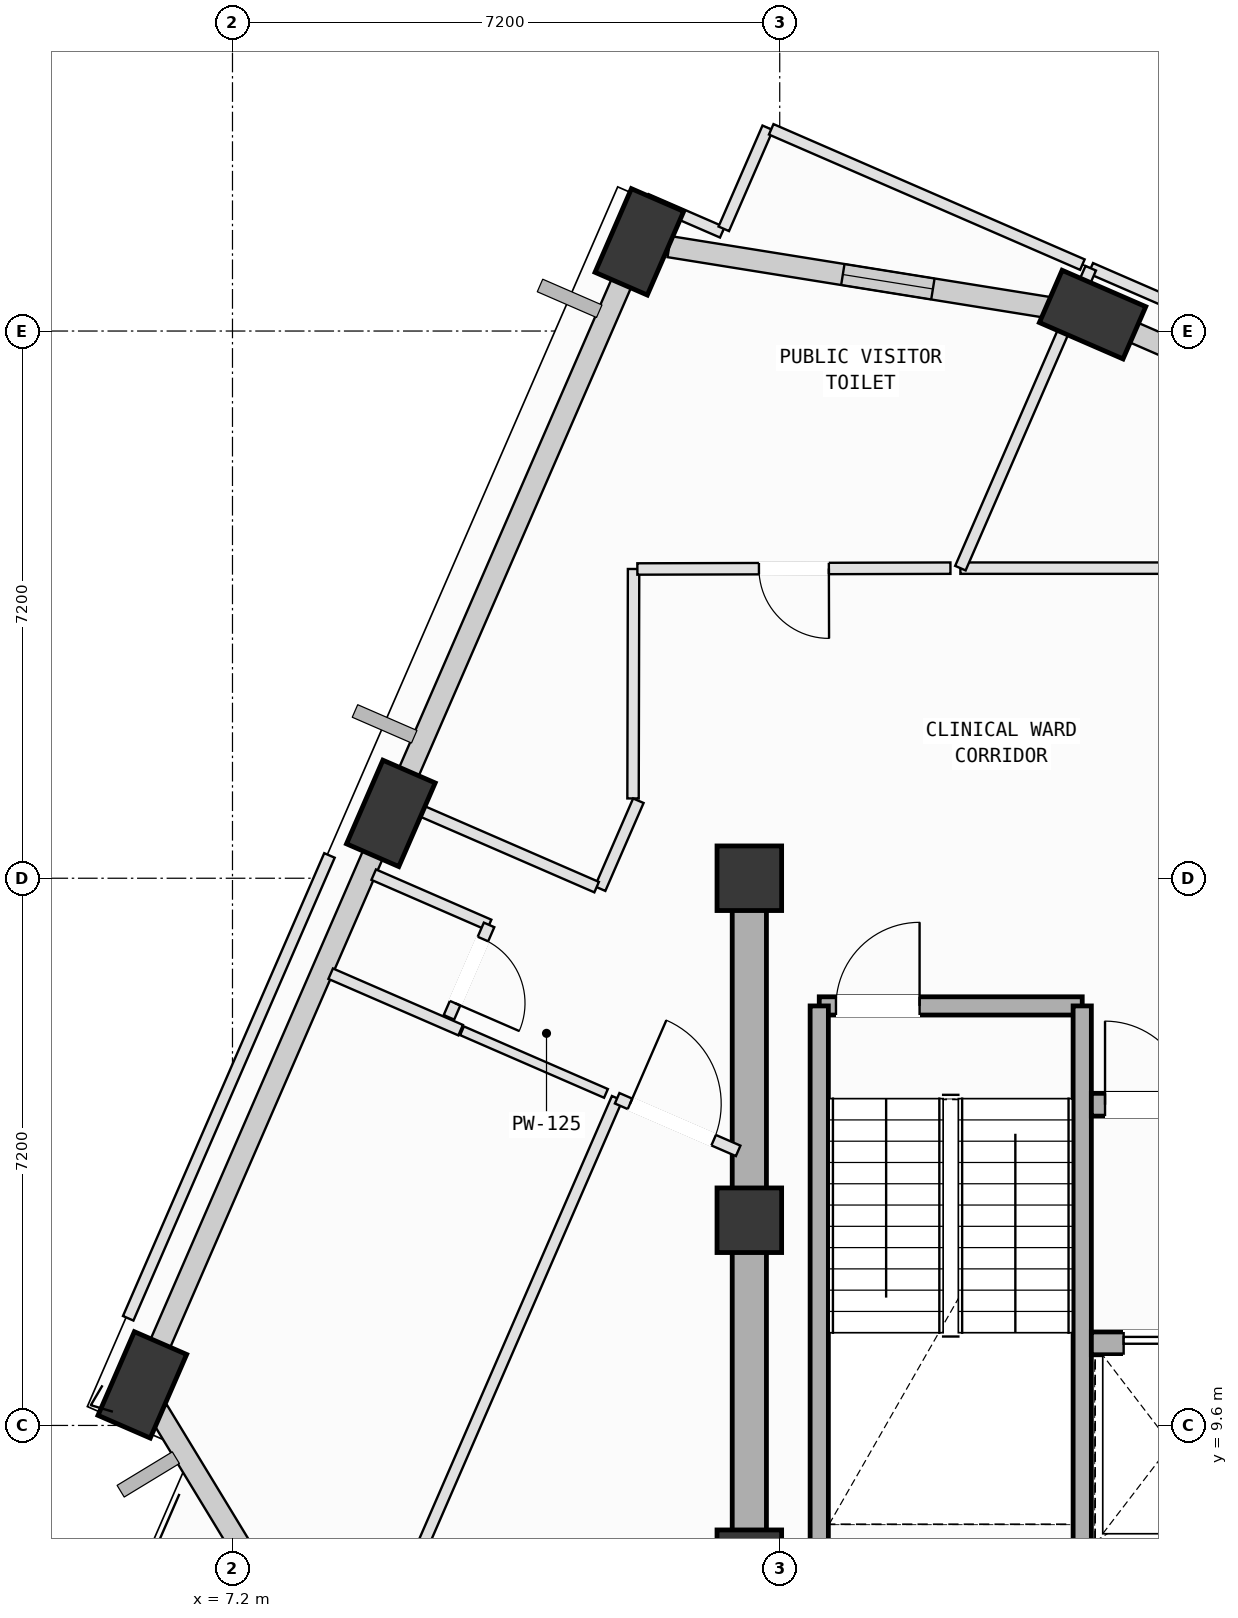
"""IFC4 building model, lengths in metres.
Left out: names, types, materials, properties, quantities, classifications, styles, units other than length and angle.
Written with IfcOpenShell. Run it as: python <this file> out.ifc"""

import sys

from ifc_helpers import new_model, si_unit, direction, frame, frame_2d, origin, origin_2d, place, context, subcontext, project, spatial, rectangle, extrude, element, fill, save


model = new_model("IFC4")
c1 = context("Model", 3, precision=1e-05, world=origin(), true_north=direction((0.0, 1.0)))
c2 = subcontext(c1, "Body", "Model", "MODEL_VIEW")
j1 = project(units=[si_unit("LENGTHUNIT", "METRE"), si_unit("PLANEANGLEUNIT", "RADIAN")], contexts=[c1])
p1 = place(None, origin())
s1 = spatial("IfcSite", under=j1, at=p1, CompositionType="ELEMENT")
p2 = place(p1, origin())
s2 = spatial("IfcBuilding", under=s1, at=p2, CompositionType="ELEMENT")
p3 = place(p2, frame((0.0, 0.0, 312.6)))
s3 = spatial("IfcBuildingStorey", under=s2, at=p3, CompositionType="ELEMENT", Elevation=312.6)
for number, where, z_axis, x_axis in (
    (1, (14.0, 7.8, 0.0), (0.0, 0.0, 1.0), (1.0, 0.0, 0.0)),
    (2, (14.0, 12.3, 0.0), (0.0, 0.0, 1.0), (1.0, 0.0, 0.0)),
    (3, (14.0, 16.8, 0.0), (0.0, 0.0, 1.0), (1.0, 0.0, 0.0)),
):
    element("IfcColumn", number, at=place(p3, frame(where, z_axis=z_axis, x_axis=x_axis)), inside=s3, PredefinedType="COLUMN", context=c2, shape_type="SweptSolid", body=[
        extrude(rectangle(XDim=0.85, YDim=0.85, at=origin_2d()), origin(), (0.0, 0.0, 1.0), 4.0),
    ])
for number, where, z_axis, x_axis in (
    (4, (18.516, 24.216, 0.002), (0.0, 0.0, 1.0), (-0.917, 0.399, 0.0)),
    (5, (12.553, 25.173, 0.002), (0.0, 0.0, 1.0), (0.399, 0.917, 0.0)),
    (6, (9.283, 17.654, 0.002), (0.0, 0.0, 1.0), (0.399, 0.917, 0.0)),
    (7, (6.014, 10.134, 0.002), (0.0, 0.0, 1.0), (0.399, 0.917, 0.0)),
):
    element("IfcColumn", number, at=place(p3, frame(where, z_axis=z_axis, x_axis=x_axis)), inside=s3, PredefinedType="COLUMN", context=c2, shape_type="SweptSolid", body=[
        extrude(rectangle(XDim=1.2, YDim=0.75, at=origin_2d()), origin(), (0.0, 0.0, 1.0), 3.996),
    ])
p4 = place(p3, frame((18.881, 24.058, 0.0), z_axis=(0.0, 0.0, 1.0), x_axis=(0.917070056253, -0.398726111414, 0.0)))
e8 = element("IfcWall", 8, at=p4, inside=s3, PredefinedType="SOLIDWALL", context=c2, shape_type="SweptSolid", body=[
    extrude(rectangle(XDim=6.405, YDim=0.28, at=frame_2d((3.202, 0.0))), origin(), (0.0, 0.0, 1.0), 3.265),
])
p5 = place(p4, frame((1.579, 0.0, 0.75)))
e9 = element("IfcOpeningElement", 9, at=p5, cuts=e8, PredefinedType="OPENING", context=c2, shape_type="SweptSolid", body=[
    extrude(rectangle(XDim=1.8, YDim=2.05, at=frame_2d((0.9, 1.025))), frame((0.0, 0.15, 0.0), z_axis=(0.0, -1.0, 0.0), x_axis=(1.0, 0.0, 0.0)), (0.0, 0.0, 1.0), 0.3),
])
p6 = place(p3, frame((12.946, 25.11, 0.0), z_axis=(0.0, 0.0, 1.0), x_axis=(0.987363821305, -0.158469821666, 0.0)))
e10 = element("IfcWall", 10, at=p6, inside=s3, PredefinedType="SOLIDWALL", context=c2, shape_type="SweptSolid", body=[
    extrude(rectangle(XDim=5.244, YDim=0.28, at=frame_2d((2.622, 0.0))), origin(), (0.0, 0.0, 1.0), 3.265),
])
p7 = place(p6, frame((2.314, 0.0, 0.75)))
e11 = element("IfcOpeningElement", 11, at=p7, cuts=e10, PredefinedType="OPENING", context=c2, shape_type="SweptSolid", body=[
    extrude(rectangle(XDim=1.2, YDim=1.75, at=frame_2d((0.6, 0.875))), frame((0.0, 0.15, 0.0), z_axis=(0.0, -1.0, 0.0), x_axis=(1.0, 0.0, 0.0)), (0.0, 0.0, 1.0), 0.3),
])
p8 = place(p3, frame((9.442, 18.018, 0.0), z_axis=(0.0, 0.0, 1.0), x_axis=(0.398768305896, 0.917051709672, 0.0)))
e12 = element("IfcWall", 12, at=p8, inside=s3, PredefinedType="SOLIDWALL", context=c2, shape_type="SweptSolid", body=[
    extrude(rectangle(XDim=7.405, YDim=0.28, at=frame_2d((3.703, 0.0))), origin(), (0.0, 0.0, 1.0), 3.265),
])
p9 = place(p3, frame((6.172, 10.498, 0.0), z_axis=(0.0, 0.0, 1.0), x_axis=(0.398740578379, 0.917063766133, 0.0)))
e13 = element("IfcWall", 13, at=p9, inside=s3, PredefinedType="SOLIDWALL", context=c2, shape_type="SweptSolid", body=[
    extrude(rectangle(XDim=7.405, YDim=0.28, at=frame_2d((3.702, 0.0))), origin(), (0.0, 0.0, 1.0), 3.265),
])
p10 = place(p3, frame((8.509, 6.027, 0.0), z_axis=(0.0, 0.0, 1.0), x_axis=(-0.51924554751, 0.854625099907, 0.0)))
e14 = element("IfcWall", 14, at=p10, inside=s3, PredefinedType="SOLIDWALL", context=c2, shape_type="SweptSolid", body=[
    extrude(rectangle(XDim=4.407, YDim=0.28, at=frame_2d((2.204, 0.0))), origin(), (0.0, 0.0, 1.0), 3.265),
])
p11 = place(p3, frame((14.92, 15.12, 0.0), z_axis=(0.0, 0.0, 1.0), x_axis=(1.0, 0.0, 0.0)))
e15 = element("IfcWall", 15, at=p11, inside=s3, PredefinedType="SOLIDWALL", context=c2, shape_type="SweptSolid", body=[
    extrude(rectangle(XDim=3.46, YDim=0.24, at=frame_2d((1.73, 0.0))), origin(), (0.0, 0.0, 1.0), 3.78),
])
p12 = place(p11, frame((0.22, 0.0, 0.0)))
e16 = element("IfcOpeningElement", 16, at=p12, cuts=e15, PredefinedType="OPENING", context=c2, shape_type="SweptSolid", body=[
    extrude(rectangle(XDim=1.1, YDim=2.15, at=frame_2d((0.55, 1.075))), frame((0.0, 0.13, 0.0), z_axis=(0.0, -1.0, 0.0), x_axis=(1.0, 0.0, 0.0)), (0.0, 0.0, 1.0), 0.26),
])
for number, where, z_axis, x_axis in (
    (17, (18.38, 15.12, 0.0), (0.0, 0.0, 1.0), (0.0, -1.0, 0.0)),
    (18, (14.92, 8.025, 0.0), (0.0, 0.0, 1.0), (0.0, 1.0, 0.0)),
):
    element("IfcWall", number, at=place(p3, frame(where, z_axis=z_axis, x_axis=x_axis)), inside=s3, PredefinedType="SOLIDWALL", context=c2, shape_type="SweptSolid", body=[
        extrude(rectangle(XDim=7.095, YDim=0.24, at=frame_2d((3.548, 0.0))), origin(), (0.0, 0.0, 1.0), 3.78),
    ])
p13 = place(p3, frame((14.0, 16.8, 0.0), z_axis=(0.0, 0.0, 1.0), x_axis=(0.0, -1.0, 0.0)))
e19 = element("IfcWall", 19, at=p13, inside=s3, PredefinedType="SHEAR", context=c2, shape_type="SweptSolid", body=[
    extrude(rectangle(XDim=9.0, YDim=0.45, at=frame_2d((4.5, 0.0))), origin(), (0.0, 0.0, 1.0), 3.78),
])
p14 = place(p3, frame((18.5, 10.68, 0.0), z_axis=(0.0, 0.0, 1.0), x_axis=(1.0, 0.0, 0.0)))
e20 = element("IfcWall", 20, at=p14, inside=s3, PredefinedType="SOLIDWALL", context=c2, shape_type="SweptSolid", body=[
    extrude(rectangle(XDim=5.3, YDim=0.3, at=frame_2d((2.65, 0.0))), origin(), (0.0, 0.0, 1.0), 3.78),
])
p15 = place(p14, frame((4.22, 0.0, 0.0)))
e21 = element("IfcOpeningElement", 21, at=p15, cuts=e20, PredefinedType="OPENING", context=c2, shape_type="SweptSolid", body=[
    extrude(rectangle(XDim=0.86, YDim=2.06, at=frame_2d((0.43, 1.03))), frame((0.0, 0.16, 0.0), z_axis=(0.0, -1.0, 0.0), x_axis=(1.0, 0.0, 0.0)), (0.0, 0.0, 1.0), 0.32),
])
p16 = place(p14, frame((0.425, 0.0, 0.0)))
e22 = element("IfcOpeningElement", 22, at=p16, cuts=e20, PredefinedType="OPENING", context=c2, shape_type="SweptSolid", body=[
    extrude(rectangle(XDim=1.25, YDim=2.18, at=frame_2d((0.625, 1.09))), frame((0.0, 0.16, 0.0), z_axis=(0.0, -1.0, 0.0), x_axis=(1.0, 0.0, 0.0)), (0.0, 0.0, 1.0), 0.32),
])
p17 = place(p14, frame((2.525, 0.0, 0.0)))
e23 = element("IfcOpeningElement", 23, at=p17, cuts=e20, PredefinedType="OPENING", context=c2, shape_type="SweptSolid", body=[
    extrude(rectangle(XDim=1.25, YDim=2.18, at=frame_2d((0.625, 1.09))), frame((0.0, 0.16, 0.0), z_axis=(0.0, -1.0, 0.0), x_axis=(1.0, 0.0, 0.0)), (0.0, 0.0, 1.0), 0.32),
])
p18 = place(p3, frame((18.5, 13.82, 0.0), z_axis=(0.0, 0.0, 1.0), x_axis=(1.0, 0.0, 0.0)))
e24 = element("IfcWall", 24, at=p18, inside=s3, PredefinedType="SOLIDWALL", context=c2, shape_type="SweptSolid", body=[
    extrude(rectangle(XDim=5.3, YDim=0.3, at=frame_2d((2.65, 0.0))), origin(), (0.0, 0.0, 1.0), 3.78),
])
p19 = place(p18, frame((0.18, 0.0, 0.0)))
e25 = element("IfcOpeningElement", 25, at=p19, cuts=e24, PredefinedType="OPENING", context=c2, shape_type="SweptSolid", body=[
    extrude(rectangle(XDim=1.1, YDim=2.15, at=frame_2d((0.55, 1.075))), frame((0.0, 0.16, 0.0), z_axis=(0.0, -1.0, 0.0), x_axis=(1.0, 0.0, 0.0)), (0.0, 0.0, 1.0), 0.32),
])
p20 = place(p3, frame((8.6, 5.487, 0.0), z_axis=(0.0, 0.0, 1.0), x_axis=(0.398808773401, 0.917034111829, 0.0)))
e26 = element("IfcWall", 26, at=p20, inside=s3, PredefinedType="PARTITIONING", context=c2, shape_type="SweptSolid", body=[
    extrude(rectangle(XDim=9.179, YDim=0.15, at=frame_2d((4.59, 0.0))), origin(), (0.0, 0.0, 1.0), 3.78),
])
p21 = place(p3, frame((12.261, 13.905, 0.0), z_axis=(0.0, 0.0, 1.0), x_axis=(0.91708123515, -0.398700398965, 0.0)))
e27 = element("IfcWall", 27, at=p21, inside=s3, PredefinedType="PARTITIONING", context=c2, shape_type="SweptSolid", body=[
    extrude(rectangle(XDim=1.736, YDim=0.15, at=frame_2d((0.868, 0.0))), origin(), (0.0, 0.0, 1.0), 3.78),
])
p22 = place(p21, frame((0.184, 0.0, 0.0)))
e28 = element("IfcOpeningElement", 28, at=p22, cuts=e27, PredefinedType="OPENING", context=c2, shape_type="SweptSolid", body=[
    extrude(rectangle(XDim=1.2, YDim=2.15, at=frame_2d((0.6, 1.075))), frame((0.0, 0.085, 0.0), z_axis=(0.0, -1.0, 0.0), x_axis=(1.0, 0.0, 0.0)), (0.0, 0.0, 1.0), 0.17),
])
p23 = place(p3, frame((8.492, 15.544, 0.0), z_axis=(0.0, 0.0, 1.0), x_axis=(0.917176199692, -0.398481892585, 0.0)))
e29 = element("IfcWall", 29, at=p23, inside=s3, PredefinedType="PARTITIONING", context=c2, shape_type="SweptSolid", body=[
    extrude(rectangle(XDim=1.864, YDim=0.15, at=frame_2d((0.932, 0.0))), origin(), (0.0, 0.0, 1.0), 3.78),
])
p24 = place(p3, frame((10.22, 14.793, 0.0), z_axis=(0.0, 0.0, 1.0), x_axis=(0.916985473765, -0.398920594735, 0.0)))
e30 = element("IfcWall", 30, at=p24, inside=s3, PredefinedType="PARTITIONING", context=c2, shape_type="SweptSolid", body=[
    extrude(rectangle(XDim=2.065, YDim=0.125, at=frame_2d((1.033, 0.0))), origin(), (0.0, 0.0, 1.0), 3.78),
])
p25 = place(p3, frame((18.492, 24.826, 0.0), z_axis=(0.0, 0.0, 1.0), x_axis=(0.917125302545, -0.398599020862, 0.0)))
e31 = element("IfcWall", 31, at=p25, inside=s3, PredefinedType="PARTITIONING", context=c2, shape_type="SweptSolid", body=[
    extrude(rectangle(XDim=5.83, YDim=0.15, at=frame_2d((2.915, 0.0))), origin(), (0.0, 0.0, 1.0), 3.78),
])
p26 = place(p3, frame((23.134, 20.88, 0.0), z_axis=(0.0, 0.0, 1.0), x_axis=(-1.0, 0.0, 0.0)))
e32 = element("IfcWall", 32, at=p26, inside=s3, PredefinedType="PARTITIONING", context=c2, shape_type="SweptSolid", body=[
    extrude(rectangle(XDim=6.357, YDim=0.15, at=frame_2d((3.178, 0.0))), origin(), (0.0, 0.0, 1.0), 3.78),
])
p27 = place(p26, frame((2.719, 0.0, 0.0)))
e33 = element("IfcOpeningElement", 33, at=p27, cuts=e32, PredefinedType="OPENING", context=c2, shape_type="SweptSolid", body=[
    extrude(rectangle(XDim=0.92, YDim=2.1, at=frame_2d((0.46, 1.05))), frame((0.0, 0.085, 0.0), z_axis=(0.0, -1.0, 0.0), x_axis=(1.0, 0.0, 0.0)), (0.0, 0.0, 1.0), 0.17),
])
p28 = place(p3, frame((16.777, 20.88, 0.0), z_axis=(0.0, 0.0, 1.0), x_axis=(0.398564265288, 0.917140407154, 0.0)))
e34 = element("IfcWall", 34, at=p28, inside=s3, PredefinedType="PARTITIONING", context=c2, shape_type="SweptSolid", body=[
    extrude(rectangle(XDim=4.302, YDim=0.15, at=frame_2d((2.151, 0.0))), origin(), (0.0, 0.0, 1.0), 2.765),
])
p29 = place(p3, frame((12.477, 20.869, 0.0), z_axis=(0.0, 0.0, 1.0), x_axis=(-0.002345323109, -0.999997249726, 0.0)))
e35 = element("IfcWall", 35, at=p29, inside=s3, PredefinedType="PARTITIONING", context=c2, shape_type="SweptSolid", body=[
    extrude(rectangle(XDim=3.019, YDim=0.15, at=frame_2d((1.509, 0.0))), origin(), (0.0, 0.0, 1.0), 3.78),
])
p30 = place(p3, frame((12.54, 17.82, 0.0), z_axis=(0.0, 0.0, 1.0), x_axis=(-0.398655347011, -0.917100820139, 0.0)))
e36 = element("IfcWall", 36, at=p30, inside=s3, PredefinedType="PARTITIONING", context=c2, shape_type="SweptSolid", body=[
    extrude(rectangle(XDim=1.261, YDim=0.15, at=frame_2d((0.631, 0.0))), origin(), (0.0, 0.0, 1.0), 3.78),
])
p31 = place(p3, frame((11.991, 16.683, 0.0), z_axis=(0.0, 0.0, 1.0), x_axis=(-0.917068787669, 0.398729029146, 0.0)))
e37 = element("IfcWall", 37, at=p31, inside=s3, PredefinedType="PARTITIONING", context=c2, shape_type="SweptSolid", body=[
    extrude(rectangle(XDim=3.06, YDim=0.15, at=frame_2d((1.53, 0.0))), origin(), (0.0, 0.0, 1.0), 2.765),
])
p32 = place(p3, frame((12.22, 24.885, 0.0), z_axis=(0.0, 0.0, 1.0), x_axis=(0.399235297463, 0.916848502894, 0.0)))
e38 = element("IfcWall", 38, at=p32, inside=s3, PredefinedType="PARTITIONING", context=c2, shape_type="SweptSolid", body=[
    extrude(rectangle(XDim=0.947, YDim=0.15, at=frame_2d((0.473, 0.0))), origin(), (0.0, 0.0, 1.0), 3.265),
])
p33 = place(p3, frame((12.644, 25.733, 0.0), z_axis=(0.0, 0.0, 1.0), x_axis=(0.9173866736, -0.397997099362, 0.0)))
e39 = element("IfcWall", 39, at=p33, inside=s3, PredefinedType="PARTITIONING", context=c2, shape_type="SweptSolid", body=[
    extrude(rectangle(XDim=1.09, YDim=0.15, at=frame_2d((0.545, 0.0))), origin(), (0.0, 0.0, 1.0), 3.265),
])
p34 = place(p3, frame((13.664, 25.345, 0.0), z_axis=(0.0, 0.0, 1.0), x_axis=(0.398732271116, 0.917067378097, 0.0)))
e40 = element("IfcWall", 40, at=p34, inside=s3, PredefinedType="PARTITIONING", context=c2, shape_type="SweptSolid", body=[
    extrude(rectangle(XDim=1.449, YDim=0.15, at=frame_2d((0.725, 0.0))), origin(), (0.0, 0.0, 1.0), 3.78),
])
p35 = place(p3, frame((14.288, 26.654, 0.0), z_axis=(0.0, 0.0, 1.0), x_axis=(0.91706744789, -0.398732110595, 0.0)))
e41 = element("IfcWall", 41, at=p35, inside=s3, PredefinedType="PARTITIONING", context=c2, shape_type="SweptSolid", body=[
    extrude(rectangle(XDim=4.464, YDim=0.15, at=frame_2d((2.232, 0.0))), origin(), (0.0, 0.0, 1.0), 3.78),
])
p36 = place(p3, frame((16.646, 20.88, 0.0), z_axis=(0.0, 0.0, 1.0), x_axis=(-0.999996442777, -0.002667289427, 0.0)))
e42 = element("IfcWall", 42, at=p36, inside=s3, PredefinedType="PARTITIONING", context=c2, shape_type="SweptSolid", body=[
    extrude(rectangle(XDim=4.119, YDim=0.15, at=frame_2d((2.06, 0.0))), origin(), (0.0, 0.0, 1.0), 3.415),
])
p37 = place(p36, frame((1.6, 0.0, 0.0)))
e43 = element("IfcOpeningElement", 43, at=p37, cuts=e42, PredefinedType="OPENING", context=c2, shape_type="SweptSolid", body=[
    extrude(rectangle(XDim=0.92, YDim=2.1, at=frame_2d((0.46, 1.05))), frame((0.0, 0.085, 0.0), z_axis=(0.0, -1.0, 0.0), x_axis=(1.0, 0.0, 0.0)), (0.0, 0.0, 1.0), 0.17),
])
p38 = place(p3, frame((5.828, 11.01, 0.0), z_axis=(0.0, 0.0, 1.0), x_axis=(0.398767783479, 0.917051936838, 0.0)))
e44 = element("IfcWall", 44, at=p38, inside=s3, PredefinedType="PARTITIONING", context=c2, shape_type="SweptSolid", body=[
    extrude(rectangle(XDim=6.641, YDim=0.15, at=frame_2d((3.32, 0.0))), origin(), (0.0, 0.0, 1.0), 3.78),
])
p39 = place(p3, frame((9.058, 16.847, 0.0), z_axis=(0.0, 0.0, 1.0), x_axis=(0.916856565806, -0.399216780382, 0.0)))
e45 = element("IfcWall", 45, at=p39, inside=s3, PredefinedType="PARTITIONING", context=c2, shape_type="SweptSolid", body=[
    extrude(rectangle(XDim=1.656, YDim=0.15, at=frame_2d((0.828, 0.0))), origin(), (0.0, 0.0, 1.0), 3.78),
])
p40 = place(p3, frame((10.576, 16.186, 0.0), z_axis=(0.0, 0.0, 1.0), x_axis=(-0.3981603712, -0.917315822825, 0.0)))
e46 = element("IfcWall", 46, at=p40, inside=s3, PredefinedType="PARTITIONING", context=c2, shape_type="SweptSolid", body=[
    extrude(rectangle(XDim=1.326, YDim=0.15, at=frame_2d((0.663, 0.0))), origin(), (0.0, 0.0, 1.0), 3.78),
])
p41 = place(p40, frame((0.203, 0.0, 0.0)))
e47 = element("IfcOpeningElement", 47, at=p41, cuts=e46, PredefinedType="OPENING", context=c2, shape_type="SweptSolid", body=[
    extrude(rectangle(XDim=0.92, YDim=2.1, at=frame_2d((0.46, 1.05))), frame((0.0, 0.085, 0.0), z_axis=(0.0, -1.0, 0.0), x_axis=(1.0, 0.0, 0.0)), (0.0, 0.0, 1.0), 0.17),
])
p42 = place(p7, origin())
e48 = element("IfcWindow", 48, at=p42, inside=s3, PartitioningType="SINGLE_PANEL", PredefinedType="WINDOW", context=c2, shape_type="SweptSolid", body=[
    extrude(rectangle(XDim=1.2, YDim=1.75, at=frame_2d((0.6, 0.875))), frame((0.0, 0.03, 0.0), z_axis=(0.0, -1.0, 0.0), x_axis=(1.0, 0.0, 0.0)), (0.0, 0.0, 1.0), 0.06),
])
fill(e11, e48)
p43 = place(p12, origin())
e49 = element("IfcDoor", 49, at=p43, inside=s3, OperationType="SINGLE_SWING_RIGHT", PredefinedType="DOOR", context=c2, shape_type="SweptSolid", body=[
    extrude(rectangle(XDim=1.1, YDim=2.15, at=frame_2d((0.55, 1.075))), frame((0.0, 0.025, 0.0), z_axis=(0.0, -1.0, 0.0), x_axis=(1.0, 0.0, 0.0)), (0.0, 0.0, 1.0), 0.05),
])
fill(e16, e49)
p44 = place(p19, origin())
e50 = element("IfcDoor", 50, at=p44, inside=s3, OperationType="SINGLE_SWING_LEFT", PredefinedType="DOOR", context=c2, shape_type="SweptSolid", body=[
    extrude(rectangle(XDim=1.1, YDim=2.15, at=frame_2d((0.55, 1.075))), frame((0.0, 0.025, 0.0), z_axis=(0.0, -1.0, 0.0), x_axis=(1.0, 0.0, 0.0)), (0.0, 0.0, 1.0), 0.05),
])
fill(e25, e50)
p45 = place(p16, origin())
e51 = element("IfcDoor", 51, at=p45, inside=s3, OperationType="DOUBLE_DOOR_SLIDING", PredefinedType="DOOR", context=c2, shape_type="SweptSolid", body=[
    extrude(rectangle(XDim=1.25, YDim=2.18, at=frame_2d((0.625, 1.09))), frame((0.0, 0.025, 0.0), z_axis=(0.0, -1.0, 0.0), x_axis=(1.0, 0.0, 0.0)), (0.0, 0.0, 1.0), 0.05),
])
fill(e22, e51)
p46 = place(p22, origin())
e52 = element("IfcDoor", 52, at=p46, inside=s3, OperationType="SINGLE_SWING_LEFT", PredefinedType="DOOR", context=c2, shape_type="SweptSolid", body=[
    extrude(rectangle(XDim=1.2, YDim=2.15, at=frame_2d((0.6, 1.075))), frame((0.0, 0.025, 0.0), z_axis=(0.0, -1.0, 0.0), x_axis=(1.0, 0.0, 0.0)), (0.0, 0.0, 1.0), 0.05),
])
fill(e28, e52)
p47 = place(p37, origin())
e53 = element("IfcDoor", 53, at=p47, inside=s3, OperationType="SINGLE_SWING_LEFT", PredefinedType="DOOR", context=c2, shape_type="SweptSolid", body=[
    extrude(rectangle(XDim=0.92, YDim=2.1, at=frame_2d((0.46, 1.05))), frame((0.0, 0.025, 0.0), z_axis=(0.0, -1.0, 0.0), x_axis=(1.0, 0.0, 0.0)), (0.0, 0.0, 1.0), 0.05),
])
fill(e43, e53)
p48 = place(p41, origin())
e54 = element("IfcDoor", 54, at=p48, inside=s3, OperationType="SINGLE_SWING_RIGHT", PredefinedType="DOOR", context=c2, shape_type="SweptSolid", body=[
    extrude(rectangle(XDim=0.92, YDim=2.1, at=frame_2d((0.46, 1.05))), frame((0.0, 0.025, 0.0), z_axis=(0.0, -1.0, 0.0), x_axis=(1.0, 0.0, 0.0)), (0.0, 0.0, 1.0), 0.05),
])
fill(e47, e54)
save(model, sys.argv[1])
